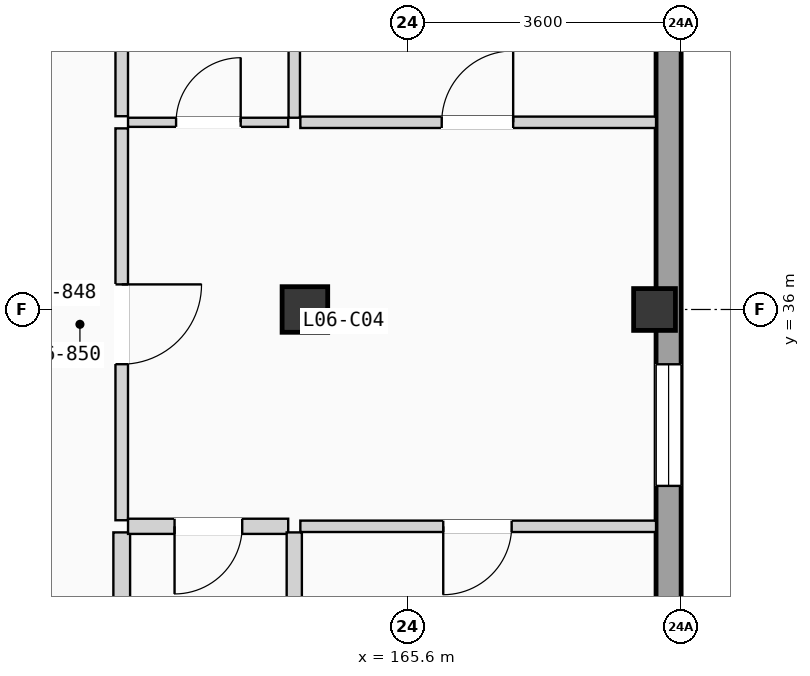
"""IFC4 building model, lengths in metres.
Left out: names, types, materials, properties, quantities, classifications, styles, units other than length and angle.
Written with IfcOpenShell. Run it as: python <this file> out.ifc"""

import sys

from ifc_helpers import new_model, si_unit, direction, frame, frame_2d, origin, origin_2d, place, context, subcontext, project, spatial, rectangle, extrude, element, fill, save


model = new_model("IFC4")
c1 = context("Model", 3, precision=1e-05, world=origin(), true_north=direction((0.0, 1.0)))
c2 = subcontext(c1, "Body", "Model", "MODEL_VIEW")
j1 = project(units=[si_unit("LENGTHUNIT", "METRE"), si_unit("PLANEANGLEUNIT", "RADIAN")], contexts=[c1])
p1 = place(None, origin())
s1 = spatial("IfcSite", under=j1, at=p1, CompositionType="ELEMENT")
p2 = place(p1, origin())
s2 = spatial("IfcBuilding", under=s1, at=p2, CompositionType="ELEMENT")
p3 = place(p2, frame((0.0, 0.0, 21.525)))
s3 = spatial("IfcBuildingStorey", under=s2, at=p3, CompositionType="ELEMENT", Elevation=21.525)
p4 = place(p3, frame((164.25, 36.0, 0.0), z_axis=(0.0, 0.0, 1.0), x_axis=(1.0, 0.0, 0.0)))
e1 = element("IfcColumn", 1, at=p4, inside=s3, PredefinedType="COLUMN", context=c2, shape_type="SweptSolid", body=[
    extrude(rectangle(XDim=0.6, YDim=0.6, at=origin_2d()), origin(), (0.0, 0.0, 1.0), 3.15),
])
p5 = place(p3, frame((168.85, 36.0, 0.0), z_axis=(0.0, 0.0, 1.0), x_axis=(1.0, 0.0, 0.0)))
e2 = element("IfcColumn", 2, at=p5, inside=s3, PredefinedType="COLUMN", context=c2, shape_type="SweptSolid", body=[
    extrude(rectangle(XDim=0.55, YDim=0.55, at=origin_2d()), origin(), (0.0, 0.0, 1.0), 3.15),
])
p6 = place(p3, frame((169.035, 0.33, 0.0), z_axis=(0.0, 0.0, 1.0), x_axis=(0.0, 1.0, 0.0)))
e3 = element("IfcWall", 3, at=p6, inside=s3, PredefinedType="SOLIDWALL", context=c2, shape_type="SweptSolid", body=[
    extrude(rectangle(XDim=49.74, YDim=0.33, at=frame_2d((24.87, 0.0))), origin(), (0.0, 0.0, 1.0), 2.89),
])
p7 = place(p6, frame((16.93, 0.0, 0.705)))
e4 = element("IfcOpeningElement", 4, at=p7, cuts=e3, PredefinedType="OPENING", context=c2, shape_type="SweptSolid", body=[
    extrude(rectangle(XDim=1.48, YDim=1.5, at=frame_2d((0.74, 0.75))), frame((0.0, 0.175, 0.0), z_axis=(0.0, -1.0, 0.0), x_axis=(1.0, 0.0, 0.0)), (0.0, 0.0, 1.0), 0.35),
])
p8 = place(p6, frame((9.415, 0.0, 0.555)))
e5 = element("IfcOpeningElement", 5, at=p8, cuts=e3, PredefinedType="OPENING", context=c2, shape_type="SweptSolid", body=[
    extrude(rectangle(XDim=1.48, YDim=1.65, at=frame_2d((0.74, 0.825))), frame((0.0, 0.175, 0.0), z_axis=(0.0, -1.0, 0.0), x_axis=(1.0, 0.0, 0.0)), (0.0, 0.0, 1.0), 0.35),
])
p9 = place(p6, frame((24.775, 0.0, 0.85)))
e6 = element("IfcOpeningElement", 6, at=p9, cuts=e3, PredefinedType="OPENING", context=c2, shape_type="SweptSolid", body=[
    extrude(rectangle(XDim=0.95, YDim=1.2, at=frame_2d((0.475, 0.6))), frame((0.0, 0.175, 0.0), z_axis=(0.0, -1.0, 0.0), x_axis=(1.0, 0.0, 0.0)), (0.0, 0.0, 1.0), 0.35),
])
p10 = place(p6, frame((33.349, 0.0, 0.9)))
e7 = element("IfcOpeningElement", 7, at=p10, cuts=e3, PredefinedType="OPENING", context=c2, shape_type="SweptSolid", body=[
    extrude(rectangle(XDim=1.6, YDim=1.2, at=frame_2d((0.8, 0.6))), frame((0.0, 0.175, 0.0), z_axis=(0.0, -1.0, 0.0), x_axis=(1.0, 0.0, 0.0)), (0.0, 0.0, 1.0), 0.35),
])
p11 = place(p6, frame((29.939, 0.0, 0.855)))
e8 = element("IfcOpeningElement", 8, at=p11, cuts=e3, PredefinedType="OPENING", context=c2, shape_type="SweptSolid", body=[
    extrude(rectangle(XDim=1.6, YDim=1.35, at=frame_2d((0.8, 0.675))), frame((0.0, 0.175, 0.0), z_axis=(0.0, -1.0, 0.0), x_axis=(1.0, 0.0, 0.0)), (0.0, 0.0, 1.0), 0.35),
])
p12 = place(p6, frame((39.541, 0.0, 0.705)))
e9 = element("IfcOpeningElement", 9, at=p12, cuts=e3, PredefinedType="OPENING", context=c2, shape_type="SweptSolid", body=[
    extrude(rectangle(XDim=1.6, YDim=1.5, at=frame_2d((0.8, 0.75))), frame((0.0, 0.175, 0.0), z_axis=(0.0, -1.0, 0.0), x_axis=(1.0, 0.0, 0.0)), (0.0, 0.0, 1.0), 0.35),
])
p13 = place(p3, frame((161.84, 33.227, 0.0), z_axis=(0.0, 0.0, 1.0), x_axis=(0.0, 1.0, 0.0)))
e10 = element("IfcWall", 10, at=p13, inside=s3, PredefinedType="PARTITIONING", context=c2, shape_type="SweptSolid", body=[
    extrude(rectangle(XDim=5.156, YDim=0.165, at=frame_2d((2.578, 0.0))), origin(), (0.0, 0.0, 1.0), 2.87),
])
p14 = place(p13, frame((2.053, 0.0, 0.0)))
e11 = element("IfcOpeningElement", 11, at=p14, cuts=e10, PredefinedType="OPENING", context=c2, shape_type="SweptSolid", body=[
    extrude(rectangle(XDim=1.05, YDim=2.13, at=frame_2d((0.525, 1.065))), frame((0.0, 0.093, 0.0), z_axis=(0.0, -1.0, 0.0), x_axis=(1.0, 0.0, 0.0)), (0.0, 0.0, 1.0), 0.185),
])
p15 = place(p3, frame((161.84, 28.81, 0.0), z_axis=(0.0, 0.0, 1.0), x_axis=(0.0, 1.0, 0.0)))
e12 = element("IfcWall", 12, at=p15, inside=s3, PredefinedType="PLUMBINGWALL", context=c2, shape_type="SweptSolid", body=[
    extrude(rectangle(XDim=4.257, YDim=0.22, at=frame_2d((2.128, 0.0))), origin(), (0.0, 0.0, 1.0), 2.87),
])
p16 = place(p3, frame((161.84, 38.543, 0.0), z_axis=(0.0, 0.0, 1.0), x_axis=(0.0, 1.0, 0.0)))
e13 = element("IfcWall", 13, at=p16, inside=s3, PredefinedType="PARTITIONING", context=c2, shape_type="SweptSolid", body=[
    extrude(rectangle(XDim=4.257, YDim=0.165, at=frame_2d((2.128, 0.0))), origin(), (0.0, 0.0, 1.0), 2.87),
])
p17 = place(p3, frame((161.923, 33.147, 0.0), z_axis=(0.0, 0.0, 1.0), x_axis=(1.0, 0.0, 0.0)))
e14 = element("IfcWall", 14, at=p17, inside=s3, PredefinedType="PLUMBINGWALL", context=c2, shape_type="SweptSolid", body=[
    extrude(rectangle(XDim=2.107, YDim=0.2, at=frame_2d((1.053, 0.0))), origin(), (0.0, 0.0, 1.0), 2.87),
])
p18 = place(p17, frame((0.612, 0.0, 0.0)))
e15 = element("IfcOpeningElement", 15, at=p18, cuts=e14, PredefinedType="OPENING", context=c2, shape_type="SweptSolid", body=[
    extrude(rectangle(XDim=0.89, YDim=2.03, at=frame_2d((0.445, 1.015))), frame((0.0, 0.11, 0.0), z_axis=(0.0, -1.0, 0.0), x_axis=(1.0, 0.0, 0.0)), (0.0, 0.0, 1.0), 0.22),
])
p19 = place(p3, frame((161.923, 38.463, 0.0), z_axis=(0.0, 0.0, 1.0), x_axis=(1.0, 0.0, 0.0)))
e16 = element("IfcWall", 16, at=p19, inside=s3, PredefinedType="PARTITIONING", context=c2, shape_type="SweptSolid", body=[
    extrude(rectangle(XDim=2.107, YDim=0.12, at=frame_2d((1.053, 0.0))), origin(), (0.0, 0.0, 1.0), 2.87),
])
p20 = place(p19, frame((0.632, 0.0, 0.0)))
e17 = element("IfcOpeningElement", 17, at=p20, cuts=e16, PredefinedType="OPENING", context=c2, shape_type="SweptSolid", body=[
    extrude(rectangle(XDim=0.85, YDim=2.01, at=frame_2d((0.425, 1.005))), frame((0.0, 0.07, 0.0), z_axis=(0.0, -1.0, 0.0), x_axis=(1.0, 0.0, 0.0)), (0.0, 0.0, 1.0), 0.14),
])
p21 = place(p3, frame((164.19, 33.147, 0.0), z_axis=(0.0, 0.0, 1.0), x_axis=(1.0, 0.0, 0.0)))
e18 = element("IfcWall", 18, at=p21, inside=s3, PredefinedType="PARTITIONING", context=c2, shape_type="SweptSolid", body=[
    extrude(rectangle(XDim=4.68, YDim=0.15, at=frame_2d((2.34, 0.0))), origin(), (0.0, 0.0, 1.0), 2.87),
])
p22 = place(p21, frame((1.88, 0.0, 0.0)))
e19 = element("IfcOpeningElement", 19, at=p22, cuts=e18, PredefinedType="OPENING", context=c2, shape_type="SweptSolid", body=[
    extrude(rectangle(XDim=0.9, YDim=2.04, at=frame_2d((0.45, 1.02))), frame((0.0, 0.085, 0.0), z_axis=(0.0, -1.0, 0.0), x_axis=(1.0, 0.0, 0.0)), (0.0, 0.0, 1.0), 0.17),
])
p23 = place(p3, frame((164.19, 38.463, 0.0), z_axis=(0.0, 0.0, 1.0), x_axis=(1.0, 0.0, 0.0)))
e20 = element("IfcWall", 20, at=p23, inside=s3, PredefinedType="PARTITIONING", context=c2, shape_type="SweptSolid", body=[
    extrude(rectangle(XDim=4.68, YDim=0.15, at=frame_2d((2.34, 0.0))), origin(), (0.0, 0.0, 1.0), 2.87),
])
p24 = place(p23, frame((1.86, 0.0, 0.0)))
e21 = element("IfcOpeningElement", 21, at=p24, cuts=e20, PredefinedType="OPENING", context=c2, shape_type="SweptSolid", body=[
    extrude(rectangle(XDim=0.94, YDim=2.06, at=frame_2d((0.47, 1.03))), frame((0.0, 0.085, 0.0), z_axis=(0.0, -1.0, 0.0), x_axis=(1.0, 0.0, 0.0)), (0.0, 0.0, 1.0), 0.17),
])
p25 = place(p3, frame((164.11, 28.81, 0.0), z_axis=(0.0, 0.0, 1.0), x_axis=(0.0, 1.0, 0.0)))
e22 = element("IfcWall", 22, at=p25, inside=s3, PredefinedType="PLUMBINGWALL", context=c2, shape_type="SweptSolid", body=[
    extrude(rectangle(XDim=4.257, YDim=0.2, at=frame_2d((2.128, 0.0))), origin(), (0.0, 0.0, 1.0), 2.87),
])
p26 = place(p3, frame((164.11, 38.523, 0.0), z_axis=(0.0, 0.0, 1.0), x_axis=(0.0, 1.0, 0.0)))
e23 = element("IfcWall", 23, at=p26, inside=s3, PredefinedType="PARTITIONING", context=c2, shape_type="SweptSolid", body=[
    extrude(rectangle(XDim=4.277, YDim=0.15, at=frame_2d((2.139, 0.0))), origin(), (0.0, 0.0, 1.0), 2.87),
])
p27 = place(p10, origin())
e24 = element("IfcWindow", 24, at=p27, inside=s3, PartitioningType="DOUBLE_PANEL_VERTICAL", PredefinedType="WINDOW", context=c2, shape_type="SweptSolid", body=[
    extrude(rectangle(XDim=1.6, YDim=1.2, at=frame_2d((0.8, 0.6))), frame((0.0, 0.03, 0.0), z_axis=(0.0, -1.0, 0.0), x_axis=(1.0, 0.0, 0.0)), (0.0, 0.0, 1.0), 0.06),
])
fill(e7, e24)
p28 = place(p14, frame((1.05, 0.0, 0.0), z_axis=(0.0, 0.0, 1.0), x_axis=(-1.0, 0.0, 0.0)))
e25 = element("IfcDoor", 25, at=p28, inside=s3, OperationType="SINGLE_SWING_RIGHT", PredefinedType="DOOR", context=c2, shape_type="SweptSolid", body=[
    extrude(rectangle(XDim=1.05, YDim=2.13, at=frame_2d((0.525, 1.065))), frame((0.0, 0.025, 0.0), z_axis=(0.0, -1.0, 0.0), x_axis=(1.0, 0.0, 0.0)), (0.0, 0.0, 1.0), 0.05),
])
fill(e11, e25)
p29 = place(p18, frame((0.89, 0.0, 0.0), z_axis=(0.0, 0.0, 1.0), x_axis=(-1.0, 0.0, 0.0)))
e26 = element("IfcDoor", 26, at=p29, inside=s3, OperationType="SINGLE_SWING_LEFT", PredefinedType="DOOR", context=c2, shape_type="SweptSolid", body=[
    extrude(rectangle(XDim=0.89, YDim=2.03, at=frame_2d((0.445, 1.015))), frame((0.0, 0.025, 0.0), z_axis=(0.0, -1.0, 0.0), x_axis=(1.0, 0.0, 0.0)), (0.0, 0.0, 1.0), 0.05),
])
fill(e15, e26)
p30 = place(p20, origin())
e27 = element("IfcDoor", 27, at=p30, inside=s3, OperationType="SINGLE_SWING_RIGHT", PredefinedType="DOOR", context=c2, shape_type="SweptSolid", body=[
    extrude(rectangle(XDim=0.85, YDim=2.01, at=frame_2d((0.425, 1.005))), frame((0.0, 0.025, 0.0), z_axis=(0.0, -1.0, 0.0), x_axis=(1.0, 0.0, 0.0)), (0.0, 0.0, 1.0), 0.05),
])
fill(e17, e27)
p31 = place(p22, frame((0.9, 0.0, 0.0), z_axis=(0.0, 0.0, 1.0), x_axis=(-1.0, 0.0, 0.0)))
e28 = element("IfcDoor", 28, at=p31, inside=s3, OperationType="SINGLE_SWING_LEFT", PredefinedType="DOOR", context=c2, shape_type="SweptSolid", body=[
    extrude(rectangle(XDim=0.9, YDim=2.04, at=frame_2d((0.45, 1.02))), frame((0.0, 0.025, 0.0), z_axis=(0.0, -1.0, 0.0), x_axis=(1.0, 0.0, 0.0)), (0.0, 0.0, 1.0), 0.05),
])
fill(e19, e28)
p32 = place(p24, origin())
e29 = element("IfcDoor", 29, at=p32, inside=s3, OperationType="SINGLE_SWING_RIGHT", PredefinedType="DOOR", context=c2, shape_type="SweptSolid", body=[
    extrude(rectangle(XDim=0.94, YDim=2.06, at=frame_2d((0.47, 1.03))), frame((0.0, 0.025, 0.0), z_axis=(0.0, -1.0, 0.0), x_axis=(1.0, 0.0, 0.0)), (0.0, 0.0, 1.0), 0.05),
])
fill(e21, e29)
save(model, sys.argv[1])
